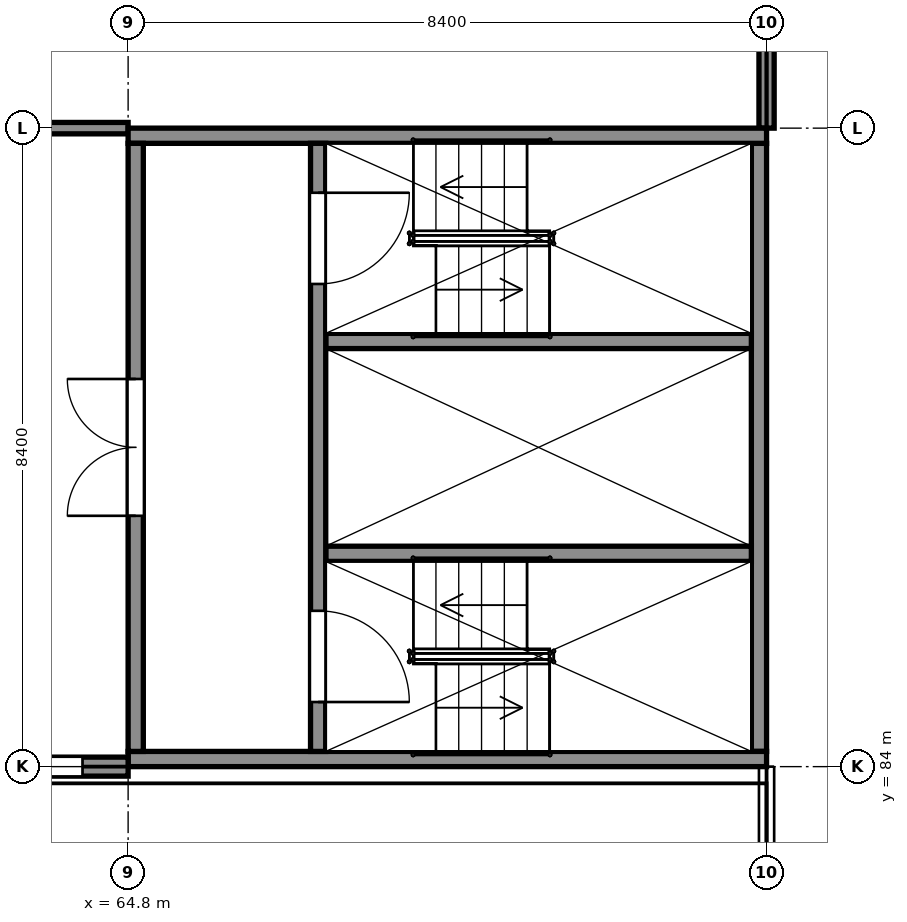
"""IFC4 building model, lengths in metres.
Left out: names, types, materials, properties, quantities, classifications, styles, units other than length and angle.
Written with IfcOpenShell. Run it as: python <this file> out.ifc"""

import sys

from ifc_helpers import new_model, si_unit, direction, frame, frame_2d, origin, place, context, subcontext, project, spatial, rectangle, extrude, element, fill, save


model = new_model("IFC4")
c1 = context("Model", 3, precision=1e-05, world=origin(), true_north=direction((0.0, 1.0)))
c2 = subcontext(c1, "Body", "Model", "MODEL_VIEW")
j1 = project(units=[si_unit("LENGTHUNIT", "METRE"), si_unit("PLANEANGLEUNIT", "RADIAN")], contexts=[c1])
p1 = place(None, origin())
s1 = spatial("IfcSite", under=j1, at=p1, CompositionType="ELEMENT")
p2 = place(p1, origin())
s2 = spatial("IfcBuilding", under=s1, at=p2, CompositionType="ELEMENT")
p3 = place(p2, frame((0.0, 0.0, 5.5)))
s3 = spatial("IfcBuildingStorey", under=s2, at=p3, CompositionType="ELEMENT", Elevation=5.5)
for number, where, z_axis, x_axis in (
    (1, (64.8, 84.1, 0.0), (0.0, 0.0, 1.0), (1.0, 0.0, 0.0)),
    (2, (64.8, 92.3, 0.0), (0.0, 0.0, 1.0), (1.0, 0.0, 0.0)),
):
    element("IfcWall", number, at=place(p3, frame(where, z_axis=z_axis, x_axis=x_axis)), inside=s3, PredefinedType="SHEAR", context=c2, shape_type="SweptSolid", body=[
        extrude(rectangle(XDim=8.4, YDim=0.2, at=frame_2d((4.2, 0.0))), origin(), (0.0, 0.0, 1.0), 5.0),
    ])
p4 = place(p3, frame((64.9, 84.2, 0.0), z_axis=(0.0, 0.0, 1.0), x_axis=(0.0, 1.0, 0.0)))
e3 = element("IfcWall", 3, at=p4, inside=s3, PredefinedType="SHEAR", context=c2, shape_type="SweptSolid", body=[
    extrude(rectangle(XDim=8.0, YDim=0.2, at=frame_2d((4.0, 0.0))), origin(), (0.0, 0.0, 1.0), 5.0),
])
p5 = place(p4, frame((3.1, 0.0, 0.0)))
e4 = element("IfcOpeningElement", 4, at=p5, cuts=e3, PredefinedType="OPENING", context=c2, shape_type="SweptSolid", body=[
    extrude(rectangle(XDim=1.8, YDim=2.1, at=frame_2d((0.9, 1.05))), frame((0.0, 0.11, 0.0), z_axis=(0.0, -1.0, 0.0), x_axis=(1.0, 0.0, 0.0)), (0.0, 0.0, 1.0), 0.22),
])
p6 = place(p3, frame((73.1, 84.2, 0.0), z_axis=(0.0, 0.0, 1.0), x_axis=(0.0, 1.0, 0.0)))
e5 = element("IfcWall", 5, at=p6, inside=s3, PredefinedType="SHEAR", context=c2, shape_type="SweptSolid", body=[
    extrude(rectangle(XDim=8.0, YDim=0.2, at=frame_2d((4.0, 0.0))), origin(), (0.0, 0.0, 1.0), 5.0),
])
p7 = place(p3, frame((67.3, 84.2, 0.0), z_axis=(0.0, 0.0, 1.0), x_axis=(0.0, 1.0, 0.0)))
e6 = element("IfcWall", 6, at=p7, inside=s3, PredefinedType="SHEAR", context=c2, shape_type="SweptSolid", body=[
    extrude(rectangle(XDim=8.0, YDim=0.2, at=frame_2d((4.0, 0.0))), origin(), (0.0, 0.0, 1.0), 5.0),
])
p8 = place(p7, frame((0.65, 0.0, 0.0)))
e7 = element("IfcOpeningElement", 7, at=p8, cuts=e6, PredefinedType="OPENING", context=c2, shape_type="SweptSolid", body=[
    extrude(rectangle(XDim=1.2, YDim=2.1, at=frame_2d((0.6, 1.05))), frame((0.0, 0.11, 0.0), z_axis=(0.0, -1.0, 0.0), x_axis=(1.0, 0.0, 0.0)), (0.0, 0.0, 1.0), 0.22),
])
p9 = place(p7, frame((6.15, 0.0, 0.0)))
e8 = element("IfcOpeningElement", 8, at=p9, cuts=e6, PredefinedType="OPENING", context=c2, shape_type="SweptSolid", body=[
    extrude(rectangle(XDim=1.2, YDim=2.1, at=frame_2d((0.6, 1.05))), frame((0.0, 0.11, 0.0), z_axis=(0.0, -1.0, 0.0), x_axis=(1.0, 0.0, 0.0)), (0.0, 0.0, 1.0), 0.22),
])
for number, where, z_axis, x_axis in (
    (9, (67.4, 86.8, 0.0), (0.0, 0.0, 1.0), (1.0, 0.0, 0.0)),
    (10, (67.4, 89.6, 0.0), (0.0, 0.0, 1.0), (1.0, 0.0, 0.0)),
):
    element("IfcWall", number, at=place(p3, frame(where, z_axis=z_axis, x_axis=x_axis)), inside=s3, PredefinedType="SHEAR", context=c2, shape_type="SweptSolid", body=[
        extrude(rectangle(XDim=5.6, YDim=0.2, at=frame_2d((2.8, 0.0))), origin(), (0.0, 0.0, 1.0), 5.0),
    ])
p10 = place(p3, frame((56.8, 84.0, 0.0), z_axis=(0.0, 0.0, 1.0), x_axis=(1.0, 0.0, 0.0)))
e11 = element("IfcWall", 11, at=p10, inside=s3, PredefinedType="SOLIDWALL", context=c2, shape_type="SweptSolid", body=[
    extrude(rectangle(XDim=8.0, YDim=0.25, at=frame_2d((4.0, 0.0))), origin(), (0.0, 0.0, 1.0), 3.94),
])
p11 = place(p10, frame((0.6, 0.0, 0.9)))
e12 = element("IfcOpeningElement", 12, at=p11, cuts=e11, PredefinedType="OPENING", context=c2, shape_type="SweptSolid", body=[
    extrude(rectangle(XDim=1.2, YDim=2.1, at=frame_2d((0.6, 1.05))), frame((0.0, 0.135, 0.0), z_axis=(0.0, -1.0, 0.0), x_axis=(1.0, 0.0, 0.0)), (0.0, 0.0, 1.0), 0.27),
])
p12 = place(p10, frame((3.4, 0.0, 0.9)))
e13 = element("IfcOpeningElement", 13, at=p12, cuts=e11, PredefinedType="OPENING", context=c2, shape_type="SweptSolid", body=[
    extrude(rectangle(XDim=1.2, YDim=2.1, at=frame_2d((0.6, 1.05))), frame((0.0, 0.135, 0.0), z_axis=(0.0, -1.0, 0.0), x_axis=(1.0, 0.0, 0.0)), (0.0, 0.0, 1.0), 0.27),
])
p13 = place(p10, frame((6.2, 0.0, 0.9)))
e14 = element("IfcOpeningElement", 14, at=p13, cuts=e11, PredefinedType="OPENING", context=c2, shape_type="SweptSolid", body=[
    extrude(rectangle(XDim=1.2, YDim=2.1, at=frame_2d((0.6, 1.05))), frame((0.0, 0.135, 0.0), z_axis=(0.0, -1.0, 0.0), x_axis=(1.0, 0.0, 0.0)), (0.0, 0.0, 1.0), 0.27),
])
p14 = place(p3, frame((56.8, 92.4, 0.0), z_axis=(0.0, 0.0, 1.0), x_axis=(1.0, 0.0, 0.0)))
e15 = element("IfcWall", 15, at=p14, inside=s3, PredefinedType="PARTITIONING", context=c2, shape_type="SweptSolid", body=[
    extrude(rectangle(XDim=8.0, YDim=0.15, at=frame_2d((4.0, 0.0))), origin(), (0.0, 0.0, 1.0), 3.9),
])
p15 = place(p3, frame((73.2, 92.4, 0.0), z_axis=(0.0, 0.0, 1.0), x_axis=(0.0, 1.0, 0.0)))
e16 = element("IfcWall", 16, at=p15, inside=s3, PredefinedType="PARTITIONING", context=c2, shape_type="SweptSolid", body=[
    extrude(rectangle(XDim=8.3, YDim=0.2, at=frame_2d((4.15, 0.0))), origin(), (0.0, 0.0, 1.0), 3.9),
])
p16 = place(p13, origin())
e17 = element("IfcWindow", 17, at=p16, inside=s3, PartitioningType="SINGLE_PANEL", PredefinedType="WINDOW", context=c2, shape_type="SweptSolid", body=[
    extrude(rectangle(XDim=1.2, YDim=2.1, at=frame_2d((0.6, 1.05))), frame((0.0, 0.105, 0.0), z_axis=(0.0, -1.0, 0.0), x_axis=(1.0, 0.0, 0.0)), (0.0, 0.0, 1.0), 0.06),
])
fill(e14, e17)
p17 = place(p5, origin())
e18 = element("IfcDoor", 18, at=p17, inside=s3, OperationType="DOUBLE_DOOR_SINGLE_SWING", PredefinedType="DOOR", context=c2, shape_type="SweptSolid", body=[
    extrude(rectangle(XDim=1.8, YDim=2.1, at=frame_2d((0.9, 1.05))), frame((0.0, 0.025, 0.0), z_axis=(0.0, -1.0, 0.0), x_axis=(1.0, 0.0, 0.0)), (0.0, 0.0, 1.0), 0.05),
])
fill(e4, e18)
p18 = place(p8, origin())
e19 = element("IfcDoor", 19, at=p18, inside=s3, OperationType="SINGLE_SWING_LEFT", PredefinedType="DOOR", context=c2, shape_type="SweptSolid", body=[
    extrude(rectangle(XDim=1.2, YDim=2.1, at=frame_2d((0.6, 1.05))), frame((0.0, 0.025, 0.0), z_axis=(0.0, -1.0, 0.0), x_axis=(1.0, 0.0, 0.0)), (0.0, 0.0, 1.0), 0.05),
])
fill(e7, e19)
p19 = place(p9, origin())
e20 = element("IfcDoor", 20, at=p19, inside=s3, OperationType="SINGLE_SWING_RIGHT", PredefinedType="DOOR", context=c2, shape_type="SweptSolid", body=[
    extrude(rectangle(XDim=1.2, YDim=2.1, at=frame_2d((0.6, 1.05))), frame((0.0, 0.025, 0.0), z_axis=(0.0, -1.0, 0.0), x_axis=(1.0, 0.0, 0.0)), (0.0, 0.0, 1.0), 0.05),
])
fill(e8, e20)
save(model, sys.argv[1])
